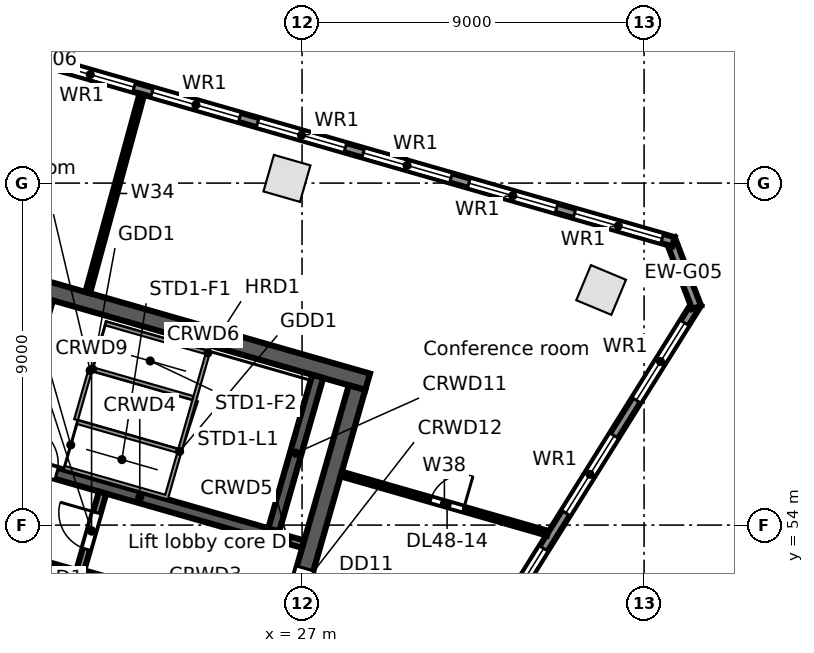
"""IFC4 building model, lengths in metres.
Left out: names, types, materials, properties, quantities, classifications, styles, units other than length and angle.
Written with IfcOpenShell. Run it as: python <this file> out.ifc"""

import sys

from ifc_helpers import new_model, si_unit, direction, frame, frame_2d, origin, origin_2d, place, context, subcontext, project, spatial, rectangle, extrude, element, fill, save


model = new_model("IFC4")
c1 = context("Model", 3, precision=1e-05, world=origin(), true_north=direction((0.0, 1.0)))
c2 = subcontext(c1, "Body", "Model", "MODEL_VIEW")
j1 = project(units=[si_unit("LENGTHUNIT", "METRE"), si_unit("PLANEANGLEUNIT", "RADIAN")], contexts=[c1])
p1 = place(None, origin())
s1 = spatial("IfcSite", under=j1, at=p1, CompositionType="ELEMENT")
p2 = place(p1, origin())
s2 = spatial("IfcBuilding", under=s1, at=p2, CompositionType="ELEMENT")
p3 = place(p2, frame((0.0, 0.0, 227.0)))
s3 = spatial("IfcBuildingStorey", under=s2, at=p3, CompositionType="ELEMENT", Elevation=227.0)
for number, where, z_axis, x_axis in (
    (1, (26.603, 63.124, 0.0), (0.0, 0.0, 1.0), (-0.961, 0.276, 0.0)),
    (2, (34.87, 60.187, 0.0), (0.0, 0.0, 1.0), (-0.923, 0.385, 0.0)),
):
    element("IfcColumn", number, at=place(p3, frame(where, z_axis=z_axis, x_axis=x_axis)), inside=s3, PredefinedType="COLUMN", context=c2, shape_type="SweptSolid", body=[
        extrude(rectangle(XDim=1.0, YDim=1.0, at=origin_2d()), origin(), (0.0, 0.0, 1.0), 3.9),
    ])
p4 = place(p3, frame((37.392, 59.84, 0.0), z_axis=(0.0, 0.0, 1.0), x_axis=(-0.529919909431, -0.848047692992, 0.0)))
e3 = element("IfcWall", 3, at=p4, inside=s3, PredefinedType="STANDARD", context=c2, shape_type="SweptSolid", body=[
    extrude(rectangle(XDim=21.104, YDim=0.25, at=frame_2d((10.552, 0.0))), origin(), (0.0, 0.0, 1.0), 3.55),
])
p5 = place(p4, frame((18.112, 0.0, 0.8)))
e4 = element("IfcOpeningElement", 4, at=p5, cuts=e3, PredefinedType="OPENING", context=c2, shape_type="SweptSolid", body=[
    extrude(rectangle(XDim=2.4, YDim=2.2, at=frame_2d((1.2, 1.1))), frame((0.0, 0.135, 0.0), z_axis=(0.0, -1.0, 0.0), x_axis=(1.0, 0.0, 0.0)), (0.0, 0.0, 1.0), 0.27),
])
p6 = place(p4, frame((14.612, 0.0, 0.8)))
e5 = element("IfcOpeningElement", 5, at=p6, cuts=e3, PredefinedType="OPENING", context=c2, shape_type="SweptSolid", body=[
    extrude(rectangle(XDim=2.4, YDim=2.2, at=frame_2d((1.2, 1.1))), frame((0.0, 0.135, 0.0), z_axis=(0.0, -1.0, 0.0), x_axis=(1.0, 0.0, 0.0)), (0.0, 0.0, 1.0), 0.27),
])
p7 = place(p4, frame((11.112, 0.0, 0.8)))
e6 = element("IfcOpeningElement", 6, at=p7, cuts=e3, PredefinedType="OPENING", context=c2, shape_type="SweptSolid", body=[
    extrude(rectangle(XDim=2.4, YDim=2.2, at=frame_2d((1.2, 1.1))), frame((0.0, 0.135, 0.0), z_axis=(0.0, -1.0, 0.0), x_axis=(1.0, 0.0, 0.0)), (0.0, 0.0, 1.0), 0.27),
])
p8 = place(p4, frame((7.612, 0.0, 0.8)))
e7 = element("IfcOpeningElement", 7, at=p8, cuts=e3, PredefinedType="OPENING", context=c2, shape_type="SweptSolid", body=[
    extrude(rectangle(XDim=2.4, YDim=2.2, at=frame_2d((1.2, 1.1))), frame((0.0, 0.135, 0.0), z_axis=(0.0, -1.0, 0.0), x_axis=(1.0, 0.0, 0.0)), (0.0, 0.0, 1.0), 0.27),
])
p9 = place(p4, frame((4.112, 0.0, 0.8)))
e8 = element("IfcOpeningElement", 8, at=p9, cuts=e3, PredefinedType="OPENING", context=c2, shape_type="SweptSolid", body=[
    extrude(rectangle(XDim=2.4, YDim=2.2, at=frame_2d((1.2, 1.1))), frame((0.0, 0.135, 0.0), z_axis=(0.0, -1.0, 0.0), x_axis=(1.0, 0.0, 0.0)), (0.0, 0.0, 1.0), 0.27),
])
p10 = place(p4, frame((0.612, 0.0, 0.8)))
e9 = element("IfcOpeningElement", 9, at=p10, cuts=e3, PredefinedType="OPENING", context=c2, shape_type="SweptSolid", body=[
    extrude(rectangle(XDim=2.4, YDim=2.2, at=frame_2d((1.2, 1.1))), frame((0.0, 0.135, 0.0), z_axis=(0.0, -1.0, 0.0), x_axis=(1.0, 0.0, 0.0)), (0.0, 0.0, 1.0), 0.27),
])
p11 = place(p3, frame((36.69, 61.531, 0.0), z_axis=(0.0, 0.0, 1.0), x_axis=(0.358377147136, -0.933576895821, 0.0)))
e10 = element("IfcWall", 10, at=p11, inside=s3, PredefinedType="STANDARD", context=c2, shape_type="SweptSolid", body=[
    extrude(rectangle(XDim=1.93, YDim=0.25, at=frame_2d((0.965, 0.0))), origin(), (0.0, 0.0, 1.0), 3.55),
])
p12 = place(p3, frame((3.34, 71.042, 0.0), z_axis=(0.0, 0.0, 1.0), x_axis=(0.96126179431, -0.275637012753, 0.0)))
e11 = element("IfcWall", 11, at=p12, inside=s3, PredefinedType="STANDARD", context=c2, shape_type="SweptSolid", body=[
    extrude(rectangle(XDim=34.779, YDim=0.25, at=frame_2d((17.39, 0.0))), origin(), (0.0, 0.0, 1.0), 3.55),
])
p13 = place(p12, frame((32.071, 0.0, 0.8)))
e12 = element("IfcOpeningElement", 12, at=p13, cuts=e11, PredefinedType="OPENING", context=c2, shape_type="SweptSolid", body=[
    extrude(rectangle(XDim=2.4, YDim=2.2, at=frame_2d((1.2, 1.1))), frame((0.0, 0.135, 0.0), z_axis=(0.0, -1.0, 0.0), x_axis=(1.0, 0.0, 0.0)), (0.0, 0.0, 1.0), 0.27),
])
p14 = place(p12, frame((29.18, 0.0, 0.8)))
e13 = element("IfcOpeningElement", 13, at=p14, cuts=e11, PredefinedType="OPENING", context=c2, shape_type="SweptSolid", body=[
    extrude(rectangle(XDim=2.4, YDim=2.2, at=frame_2d((1.2, 1.1))), frame((0.0, 0.135, 0.0), z_axis=(0.0, -1.0, 0.0), x_axis=(1.0, 0.0, 0.0)), (0.0, 0.0, 1.0), 0.27),
])
p15 = place(p12, frame((26.289, 0.0, 0.8)))
e14 = element("IfcOpeningElement", 14, at=p15, cuts=e11, PredefinedType="OPENING", context=c2, shape_type="SweptSolid", body=[
    extrude(rectangle(XDim=2.4, YDim=2.2, at=frame_2d((1.2, 1.1))), frame((0.0, 0.135, 0.0), z_axis=(0.0, -1.0, 0.0), x_axis=(1.0, 0.0, 0.0)), (0.0, 0.0, 1.0), 0.27),
])
p16 = place(p12, frame((23.398, 0.0, 0.8)))
e15 = element("IfcOpeningElement", 15, at=p16, cuts=e11, PredefinedType="OPENING", context=c2, shape_type="SweptSolid", body=[
    extrude(rectangle(XDim=2.4, YDim=2.2, at=frame_2d((1.2, 1.1))), frame((0.0, 0.135, 0.0), z_axis=(0.0, -1.0, 0.0), x_axis=(1.0, 0.0, 0.0)), (0.0, 0.0, 1.0), 0.27),
])
p17 = place(p12, frame((20.508, 0.0, 0.8)))
e16 = element("IfcOpeningElement", 16, at=p17, cuts=e11, PredefinedType="OPENING", context=c2, shape_type="SweptSolid", body=[
    extrude(rectangle(XDim=2.4, YDim=2.2, at=frame_2d((1.2, 1.1))), frame((0.0, 0.135, 0.0), z_axis=(0.0, -1.0, 0.0), x_axis=(1.0, 0.0, 0.0)), (0.0, 0.0, 1.0), 0.27),
])
p18 = place(p12, frame((17.616, 0.0, 0.8)))
e17 = element("IfcOpeningElement", 17, at=p18, cuts=e11, PredefinedType="OPENING", context=c2, shape_type="SweptSolid", body=[
    extrude(rectangle(XDim=2.4, YDim=2.2, at=frame_2d((1.2, 1.1))), frame((0.0, 0.135, 0.0), z_axis=(0.0, -1.0, 0.0), x_axis=(1.0, 0.0, 0.0)), (0.0, 0.0, 1.0), 0.27),
])
p19 = place(p12, frame((14.726, 0.0, 0.8)))
e18 = element("IfcOpeningElement", 18, at=p19, cuts=e11, PredefinedType="OPENING", context=c2, shape_type="SweptSolid", body=[
    extrude(rectangle(XDim=2.4, YDim=2.2, at=frame_2d((1.2, 1.1))), frame((0.0, 0.135, 0.0), z_axis=(0.0, -1.0, 0.0), x_axis=(1.0, 0.0, 0.0)), (0.0, 0.0, 1.0), 0.27),
])
p20 = place(p12, frame((11.834, 0.0, 0.8)))
e19 = element("IfcOpeningElement", 19, at=p20, cuts=e11, PredefinedType="OPENING", context=c2, shape_type="SweptSolid", body=[
    extrude(rectangle(XDim=2.4, YDim=2.2, at=frame_2d((1.2, 1.1))), frame((0.0, 0.135, 0.0), z_axis=(0.0, -1.0, 0.0), x_axis=(1.0, 0.0, 0.0)), (0.0, 0.0, 1.0), 0.27),
])
p21 = place(p12, frame((8.944, 0.0, 0.8)))
e20 = element("IfcOpeningElement", 20, at=p21, cuts=e11, PredefinedType="OPENING", context=c2, shape_type="SweptSolid", body=[
    extrude(rectangle(XDim=2.4, YDim=2.2, at=frame_2d((1.2, 1.1))), frame((0.0, 0.135, 0.0), z_axis=(0.0, -1.0, 0.0), x_axis=(1.0, 0.0, 0.0)), (0.0, 0.0, 1.0), 0.27),
])
p22 = place(p12, frame((6.052, 0.0, 0.8)))
e21 = element("IfcOpeningElement", 21, at=p22, cuts=e11, PredefinedType="OPENING", context=c2, shape_type="SweptSolid", body=[
    extrude(rectangle(XDim=2.4, YDim=2.2, at=frame_2d((1.2, 1.1))), frame((0.0, 0.135, 0.0), z_axis=(0.0, -1.0, 0.0), x_axis=(1.0, 0.0, 0.0)), (0.0, 0.0, 1.0), 0.27),
])
p23 = place(p12, frame((3.162, 0.0, 0.8)))
e22 = element("IfcOpeningElement", 22, at=p23, cuts=e11, PredefinedType="OPENING", context=c2, shape_type="SweptSolid", body=[
    extrude(rectangle(XDim=2.4, YDim=2.2, at=frame_2d((1.2, 1.1))), frame((0.0, 0.135, 0.0), z_axis=(0.0, -1.0, 0.0), x_axis=(1.0, 0.0, 0.0)), (0.0, 0.0, 1.0), 0.27),
])
p24 = place(p12, frame((0.271, 0.0, 0.8)))
e23 = element("IfcOpeningElement", 23, at=p24, cuts=e11, PredefinedType="OPENING", context=c2, shape_type="SweptSolid", body=[
    extrude(rectangle(XDim=2.4, YDim=2.2, at=frame_2d((1.2, 1.1))), frame((0.0, 0.135, 0.0), z_axis=(0.0, -1.0, 0.0), x_axis=(1.0, 0.0, 0.0)), (0.0, 0.0, 1.0), 0.27),
])
p25 = place(p3, frame((18.583, 53.423, 0.0), z_axis=(0.0, 0.0, 1.0), x_axis=(0.961259287968, -0.275645753268, 0.0)))
e24 = element("IfcWall", 24, at=p25, inside=s3, PredefinedType="SOLIDWALL", context=c2, shape_type="SweptSolid", body=[
    extrude(rectangle(XDim=2.65, YDim=0.2, at=frame_2d((1.325, 0.0))), origin(), (0.0, 0.0, 1.0), 3.55),
])
p26 = place(p3, frame((21.131, 52.692, 0.0), z_axis=(0.0, 0.0, 1.0), x_axis=(0.961261488075, -0.275638080722, 0.0)))
e25 = element("IfcWall", 25, at=p26, inside=s3, PredefinedType="SOLIDWALL", context=c2, shape_type="SweptSolid", body=[
    extrude(rectangle(XDim=5.45, YDim=0.3, at=frame_2d((2.725, 0.0))), origin(), (0.0, 0.0, 1.0), 3.55),
])
p27 = place(p26, frame((0.95, 0.0, 0.0)))
e26 = element("IfcOpeningElement", 26, at=p27, cuts=e25, PredefinedType="OPENING", context=c2, shape_type="SweptSolid", body=[
    extrude(rectangle(XDim=0.9, YDim=2.1, at=frame_2d((0.45, 1.05))), frame((0.0, 0.16, 0.0), z_axis=(0.0, -1.0, 0.0), x_axis=(1.0, 0.0, 0.0)), (0.0, 0.0, 1.0), 0.32),
])
p28 = place(p26, frame((3.75, 0.0, 0.0)))
e27 = element("IfcOpeningElement", 27, at=p28, cuts=e25, PredefinedType="OPENING", context=c2, shape_type="SweptSolid", body=[
    extrude(rectangle(XDim=0.9, YDim=2.1, at=frame_2d((0.45, 1.05))), frame((0.0, 0.16, 0.0), z_axis=(0.0, -1.0, 0.0), x_axis=(1.0, 0.0, 0.0)), (0.0, 0.0, 1.0), 0.32),
])
p29 = place(p3, frame((19.245, 55.73, 0.0), z_axis=(0.0, 0.0, 1.0), x_axis=(0.961263007877, -0.275632780503, 0.0)))
e28 = element("IfcWall", 28, at=p29, inside=s3, PredefinedType="SOLIDWALL", context=c2, shape_type="SweptSolid", body=[
    extrude(rectangle(XDim=7.25, YDim=0.3, at=frame_2d((3.625, 0.0))), origin(), (0.0, 0.0, 1.0), 3.55),
])
p30 = place(p29, frame((0.35, 0.0, 0.0)))
e29 = element("IfcOpeningElement", 29, at=p30, cuts=e28, PredefinedType="OPENING", context=c2, shape_type="SweptSolid", body=[
    extrude(rectangle(XDim=1.0, YDim=2.1, at=frame_2d((0.5, 1.05))), frame((0.0, 0.16, 0.0), z_axis=(0.0, -1.0, 0.0), x_axis=(1.0, 0.0, 0.0)), (0.0, 0.0, 1.0), 0.32),
])
p31 = place(p3, frame((26.214, 53.732, 0.0), z_axis=(0.0, 0.0, 1.0), x_axis=(0.961241665642, -0.275707200184, 0.0)))
e30 = element("IfcWall", 30, at=p31, inside=s3, PredefinedType="SOLIDWALL", context=c2, shape_type="SweptSolid", body=[
    extrude(rectangle(XDim=0.85, YDim=0.2, at=frame_2d((0.425, 0.0))), origin(), (0.0, 0.0, 1.0), 3.55),
])
p32 = place(p3, frame((20.073, 60.252, 0.0), z_axis=(0.0, 0.0, 1.0), x_axis=(0.96126248289, -0.275634611374, 0.0)))
e31 = element("IfcWall", 31, at=p32, inside=s3, PredefinedType="SOLIDWALL", context=c2, shape_type="SweptSolid", body=[
    extrude(rectangle(XDim=9.0, YDim=0.45, at=frame_2d((4.5, 0.0))), origin(), (0.0, 0.0, 1.0), 3.55),
])
p33 = place(p3, frame((17.168, 49.303, 0.0), z_axis=(0.0, 0.0, 1.0), x_axis=(0.275638974822, 0.961261231695, 0.0)))
e32 = element("IfcWall", 32, at=p33, inside=s3, PredefinedType="SOLIDWALL", context=c2, shape_type="SweptSolid", body=[
    extrude(rectangle(XDim=11.1, YDim=0.45, at=frame_2d((5.55, 0.0))), origin(), (0.0, 0.0, 1.0), 3.55),
])
p34 = place(p33, frame((4.95, 0.0, 0.0)))
e33 = element("IfcOpeningElement", 33, at=p34, cuts=e32, PredefinedType="OPENING", context=c2, shape_type="SweptSolid", body=[
    extrude(rectangle(XDim=1.2, YDim=2.1, at=frame_2d((0.6, 1.05))), frame((0.0, 0.235, 0.0), z_axis=(0.0, -1.0, 0.0), x_axis=(1.0, 0.0, 0.0)), (0.0, 0.0, 1.0), 0.47),
])
p35 = place(p3, frame((21.172, 52.837, 0.0), z_axis=(0.0, 0.0, 1.0), x_axis=(0.275657676022, 0.961255868981, 0.0)))
e34 = element("IfcWall", 34, at=p35, inside=s3, PredefinedType="PARTITIONING", context=c2, shape_type="SweptSolid", body=[
    extrude(rectangle(XDim=2.1, YDim=0.2, at=frame_2d((1.05, 0.0))), origin(), (0.0, 0.0, 1.0), 3.55),
])
p36 = place(p35, frame((0.55, 0.0, 0.0)))
e35 = element("IfcOpeningElement", 35, at=p36, cuts=e34, PredefinedType="OPENING", context=c2, shape_type="SweptSolid", body=[
    extrude(rectangle(XDim=1.0, YDim=2.1, at=frame_2d((0.5, 1.05))), frame((0.0, 0.11, 0.0), z_axis=(0.0, -1.0, 0.0), x_axis=(1.0, 0.0, 0.0)), (0.0, 0.0, 1.0), 0.22),
])
p37 = place(p3, frame((26.256, 53.876, 0.0), z_axis=(0.0, 0.0, 1.0), x_axis=(0.275588560745, 0.96127568636, 0.0)))
e36 = element("IfcWall", 36, at=p37, inside=s3, PredefinedType="SOLIDWALL", context=c2, shape_type="SweptSolid", body=[
    extrude(rectangle(XDim=4.2, YDim=0.3, at=frame_2d((2.1, 0.0))), origin(), (0.0, 0.0, 1.0), 3.55),
])
p38 = place(p3, frame((25.387, 46.947, 0.0), z_axis=(0.0, 0.0, 1.0), x_axis=(0.275638974822, 0.961261231695, 0.0)))
e37 = element("IfcWall", 37, at=p38, inside=s3, PredefinedType="SOLIDWALL", context=c2, shape_type="SweptSolid", body=[
    extrude(rectangle(XDim=11.1, YDim=0.45, at=frame_2d((5.55, 0.0))), origin(), (0.0, 0.0, 1.0), 3.55),
])
p39 = place(p38, frame((4.95, 0.0, 0.0)))
e38 = element("IfcOpeningElement", 38, at=p39, cuts=e37, PredefinedType="OPENING", context=c2, shape_type="SweptSolid", body=[
    extrude(rectangle(XDim=1.2, YDim=2.1, at=frame_2d((0.6, 1.05))), frame((0.0, 0.235, 0.0), z_axis=(0.0, -1.0, 0.0), x_axis=(1.0, 0.0, 0.0)), (0.0, 0.0, 1.0), 0.47),
])
p40 = place(p3, frame((21.36, 60.117, 0.0), z_axis=(0.0, 0.0, 1.0), x_axis=(0.263151767798, 0.964754449124, 0.0)))
e39 = element("IfcWall", 39, at=p40, inside=s3, PredefinedType="PARTITIONING", context=c2, shape_type="SweptSolid", body=[
    extrude(rectangle(XDim=5.411, YDim=0.125, at=frame_2d((2.705, 0.0))), origin(), (0.0, 0.0, 1.0), 2.918),
])
p41 = place(p3, frame((28.029, 55.344, 0.0), z_axis=(0.0, 0.0, 1.0), x_axis=(0.961249621014, -0.275679462603, 0.0)))
e40 = element("IfcWall", 40, at=p41, inside=s3, PredefinedType="PARTITIONING", context=c2, shape_type="SweptSolid", body=[
    extrude(rectangle(XDim=5.652, YDim=0.125, at=frame_2d((2.826, 0.0))), origin(), (0.0, 0.0, 1.0), 2.83),
])
p42 = place(p41, frame((2.45, 0.0, 0.0)))
e41 = element("IfcOpeningElement", 41, at=p42, cuts=e40, PredefinedType="OPENING", context=c2, shape_type="SweptSolid", body=[
    extrude(rectangle(XDim=0.9, YDim=2.1, at=frame_2d((0.45, 1.05))), frame((0.0, 0.073, 0.0), z_axis=(0.0, -1.0, 0.0), x_axis=(1.0, 0.0, 0.0)), (0.0, 0.0, 1.0), 0.145),
])
p43 = place(p8, origin())
e42 = element("IfcWindow", 42, at=p43, inside=s3, PartitioningType="SINGLE_PANEL", PredefinedType="WINDOW", context=c2, shape_type="SweptSolid", body=[
    extrude(rectangle(XDim=2.4, YDim=2.2, at=frame_2d((1.2, 1.1))), frame((0.0, 0.03, 0.0), z_axis=(0.0, -1.0, 0.0), x_axis=(1.0, 0.0, 0.0)), (0.0, 0.0, 1.0), 0.06),
])
fill(e7, e42)
p44 = place(p9, origin())
e43 = element("IfcWindow", 43, at=p44, inside=s3, PartitioningType="SINGLE_PANEL", PredefinedType="WINDOW", context=c2, shape_type="SweptSolid", body=[
    extrude(rectangle(XDim=2.4, YDim=2.2, at=frame_2d((1.2, 1.1))), frame((0.0, 0.03, 0.0), z_axis=(0.0, -1.0, 0.0), x_axis=(1.0, 0.0, 0.0)), (0.0, 0.0, 1.0), 0.06),
])
fill(e8, e43)
p45 = place(p10, origin())
e44 = element("IfcWindow", 44, at=p45, inside=s3, PartitioningType="SINGLE_PANEL", PredefinedType="WINDOW", context=c2, shape_type="SweptSolid", body=[
    extrude(rectangle(XDim=2.4, YDim=2.2, at=frame_2d((1.2, 1.1))), frame((0.0, 0.03, 0.0), z_axis=(0.0, -1.0, 0.0), x_axis=(1.0, 0.0, 0.0)), (0.0, 0.0, 1.0), 0.06),
])
fill(e9, e44)
p46 = place(p13, origin())
e45 = element("IfcWindow", 45, at=p46, inside=s3, PartitioningType="SINGLE_PANEL", PredefinedType="WINDOW", context=c2, shape_type="SweptSolid", body=[
    extrude(rectangle(XDim=2.4, YDim=2.2, at=frame_2d((1.2, 1.1))), frame((0.0, 0.03, 0.0), z_axis=(0.0, -1.0, 0.0), x_axis=(1.0, 0.0, 0.0)), (0.0, 0.0, 1.0), 0.06),
])
fill(e12, e45)
p47 = place(p14, origin())
e46 = element("IfcWindow", 46, at=p47, inside=s3, PartitioningType="SINGLE_PANEL", PredefinedType="WINDOW", context=c2, shape_type="SweptSolid", body=[
    extrude(rectangle(XDim=2.4, YDim=2.2, at=frame_2d((1.2, 1.1))), frame((0.0, 0.03, 0.0), z_axis=(0.0, -1.0, 0.0), x_axis=(1.0, 0.0, 0.0)), (0.0, 0.0, 1.0), 0.06),
])
fill(e13, e46)
p48 = place(p15, origin())
e47 = element("IfcWindow", 47, at=p48, inside=s3, PartitioningType="SINGLE_PANEL", PredefinedType="WINDOW", context=c2, shape_type="SweptSolid", body=[
    extrude(rectangle(XDim=2.4, YDim=2.2, at=frame_2d((1.2, 1.1))), frame((0.0, 0.03, 0.0), z_axis=(0.0, -1.0, 0.0), x_axis=(1.0, 0.0, 0.0)), (0.0, 0.0, 1.0), 0.06),
])
fill(e14, e47)
p49 = place(p16, origin())
e48 = element("IfcWindow", 48, at=p49, inside=s3, PartitioningType="SINGLE_PANEL", PredefinedType="WINDOW", context=c2, shape_type="SweptSolid", body=[
    extrude(rectangle(XDim=2.4, YDim=2.2, at=frame_2d((1.2, 1.1))), frame((0.0, 0.03, 0.0), z_axis=(0.0, -1.0, 0.0), x_axis=(1.0, 0.0, 0.0)), (0.0, 0.0, 1.0), 0.06),
])
fill(e15, e48)
p50 = place(p17, origin())
e49 = element("IfcWindow", 49, at=p50, inside=s3, PartitioningType="SINGLE_PANEL", PredefinedType="WINDOW", context=c2, shape_type="SweptSolid", body=[
    extrude(rectangle(XDim=2.4, YDim=2.2, at=frame_2d((1.2, 1.1))), frame((0.0, 0.03, 0.0), z_axis=(0.0, -1.0, 0.0), x_axis=(1.0, 0.0, 0.0)), (0.0, 0.0, 1.0), 0.06),
])
fill(e16, e49)
p51 = place(p18, origin())
e50 = element("IfcWindow", 50, at=p51, inside=s3, PartitioningType="SINGLE_PANEL", PredefinedType="WINDOW", context=c2, shape_type="SweptSolid", body=[
    extrude(rectangle(XDim=2.4, YDim=2.2, at=frame_2d((1.2, 1.1))), frame((0.0, 0.03, 0.0), z_axis=(0.0, -1.0, 0.0), x_axis=(1.0, 0.0, 0.0)), (0.0, 0.0, 1.0), 0.06),
])
fill(e17, e50)
p52 = place(p30, origin())
e51 = element("IfcDoor", 51, at=p52, inside=s3, OperationType="SINGLE_SWING_LEFT", PredefinedType="DOOR", context=c2, shape_type="SweptSolid", body=[
    extrude(rectangle(XDim=1.0, YDim=2.1, at=frame_2d((0.5, 1.05))), frame((0.0, 0.025, 0.0), z_axis=(0.0, -1.0, 0.0), x_axis=(1.0, 0.0, 0.0)), (0.0, 0.0, 1.0), 0.05),
])
fill(e29, e51)
p53 = place(p36, origin())
e52 = element("IfcDoor", 52, at=p53, inside=s3, OperationType="SINGLE_SWING_RIGHT", PredefinedType="DOOR", context=c2, shape_type="SweptSolid", body=[
    extrude(rectangle(XDim=1.0, YDim=2.1, at=frame_2d((0.5, 1.05))), frame((0.0, 0.025, 0.0), z_axis=(0.0, -1.0, 0.0), x_axis=(1.0, 0.0, 0.0)), (0.0, 0.0, 1.0), 0.05),
])
fill(e35, e52)
p54 = place(p39, frame((1.2, 0.0, 0.0), z_axis=(0.0, 0.0, 1.0), x_axis=(-1.0, 0.0, 0.0)))
e53 = element("IfcDoor", 53, at=p54, inside=s3, OperationType="SINGLE_SWING_RIGHT", PredefinedType="DOOR", context=c2, shape_type="SweptSolid", body=[
    extrude(rectangle(XDim=1.2, YDim=2.1, at=frame_2d((0.6, 1.05))), frame((0.0, 0.025, 0.0), z_axis=(0.0, -1.0, 0.0), x_axis=(1.0, 0.0, 0.0)), (0.0, 0.0, 1.0), 0.05),
])
fill(e38, e53)
p55 = place(p42, origin())
e54 = element("IfcDoor", 54, at=p55, inside=s3, OperationType="SINGLE_SWING_RIGHT", PredefinedType="DOOR", context=c2, shape_type="SweptSolid", body=[
    extrude(rectangle(XDim=0.9, YDim=2.1, at=frame_2d((0.45, 1.05))), frame((0.0, 0.025, 0.0), z_axis=(0.0, -1.0, 0.0), x_axis=(1.0, 0.0, 0.0)), (0.0, 0.0, 1.0), 0.05),
])
fill(e41, e54)
save(model, sys.argv[1])
